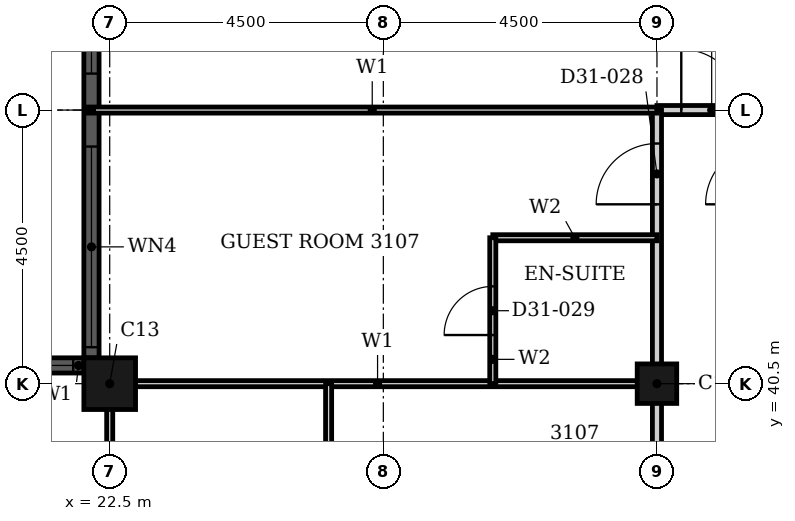
"""IFC4 building model, lengths in metres.
Left out: names, types, materials, properties, quantities, classifications, styles, units other than length and angle.
Written with IfcOpenShell. Run it as: python <this file> out.ifc"""

import sys

from ifc_helpers import new_model, si_unit, direction, frame, frame_2d, origin, origin_2d, place, context, subcontext, project, spatial, rectangle, hollow_rectangle, extrude, element, fill, save


model = new_model("IFC4")
c1 = context("Model", 3, precision=1e-05, world=origin(), true_north=direction((0.0, 1.0)))
c2 = subcontext(c1, "Body", "Model", "MODEL_VIEW")
j1 = project(units=[si_unit("LENGTHUNIT", "METRE"), si_unit("PLANEANGLEUNIT", "RADIAN")], contexts=[c1])
p1 = place(None, origin())
s1 = spatial("IfcSite", under=j1, at=p1, CompositionType="ELEMENT")
p2 = place(p1, origin())
s2 = spatial("IfcBuilding", under=s1, at=p2, CompositionType="ELEMENT")
p3 = place(p2, frame((0.0, 0.0, 126.0)))
s3 = spatial("IfcBuildingStorey", under=s2, at=p3, CompositionType="ELEMENT", Elevation=126.0)
p4 = place(p3, frame((22.5, 40.5, 0.0), z_axis=(0.0, 0.0, 1.0), x_axis=(1.0, 0.0, 0.0)))
e1 = element("IfcColumn", 1, at=p4, inside=s3, PredefinedType="COLUMN", context=c2, shape_type="SweptSolid", body=[
    extrude(hollow_rectangle(XDim=0.85, YDim=0.85, WallThickness=0.026, at=origin_2d()), origin(), (0.0, 0.0, 1.0), 3.6),
])
p5 = place(p3, frame((31.5, 40.5, 0.0), z_axis=(0.0, 0.0, 1.0), x_axis=(1.0, 0.0, 0.0)))
e2 = element("IfcColumn", 2, at=p5, inside=s3, PredefinedType="COLUMN", context=c2, shape_type="SweptSolid", body=[
    extrude(hollow_rectangle(XDim=0.65, YDim=0.65, WallThickness=0.021, at=origin_2d()), origin(), (0.0, 0.0, 1.0), 3.6),
])
p6 = place(p3, frame((22.2, 49.075, 0.0), z_axis=(0.0, 0.0, 1.0), x_axis=(0.0, -1.0, 0.0)))
e3 = element("IfcWall", 3, at=p6, inside=s3, PredefinedType="SOLIDWALL", context=c2, shape_type="SweptSolid", body=[
    extrude(rectangle(XDim=8.15, YDim=0.25, at=frame_2d((4.075, 0.0))), origin(), (0.0, 0.0, 1.0), 3.6),
])
p7 = place(p6, frame((0.175, 0.0, 0.9)))
e4 = element("IfcOpeningElement", 4, at=p7, cuts=e3, PredefinedType="OPENING", context=c2, shape_type="SweptSolid", body=[
    extrude(rectangle(XDim=3.3, YDim=2.08, at=frame_2d((1.65, 1.04))), frame((0.0, 0.135, 0.0), z_axis=(0.0, -1.0, 0.0), x_axis=(1.0, 0.0, 0.0)), (0.0, 0.0, 1.0), 0.27),
])
p8 = place(p6, frame((4.675, 0.0, 0.9)))
e5 = element("IfcOpeningElement", 5, at=p8, cuts=e3, PredefinedType="OPENING", context=c2, shape_type="SweptSolid", body=[
    extrude(rectangle(XDim=3.3, YDim=2.08, at=frame_2d((1.65, 1.04))), frame((0.0, 0.135, 0.0), z_axis=(0.0, -1.0, 0.0), x_axis=(1.0, 0.0, 0.0)), (0.0, 0.0, 1.0), 0.27),
])
p9 = place(p3, frame((22.075, 40.8, 0.0), z_axis=(0.0, 0.0, 1.0), x_axis=(-1.0, 0.0, 0.0)))
e6 = element("IfcWall", 6, at=p9, inside=s3, PredefinedType="SOLIDWALL", context=c2, shape_type="SweptSolid", body=[
    extrude(rectangle(XDim=3.65, YDim=0.25, at=frame_2d((1.825, 0.0))), origin(), (0.0, 0.0, 1.0), 3.6),
])
p10 = place(p9, frame((0.175, 0.0, 0.9)))
e7 = element("IfcOpeningElement", 7, at=p10, cuts=e6, PredefinedType="OPENING", context=c2, shape_type="SweptSolid", body=[
    extrude(rectangle(XDim=3.3, YDim=2.08, at=frame_2d((1.65, 1.04))), frame((0.0, 0.135, 0.0), z_axis=(0.0, -1.0, 0.0), x_axis=(1.0, 0.0, 0.0)), (0.0, 0.0, 1.0), 0.27),
])
p11 = place(p3, frame((31.5, 45.0, 0.0), z_axis=(0.0, 0.0, 1.0), x_axis=(1.0, 0.0, 0.0)))
e8 = element("IfcWall", 8, at=p11, inside=s3, PredefinedType="PARTITIONING", context=c2, shape_type="SweptSolid", body=[
    extrude(rectangle(XDim=1.8, YDim=0.15, at=frame_2d((0.9, 0.0))), origin(), (0.0, 0.0, 1.0), 3.3),
])
p12 = place(p11, frame((0.4, 0.0, 0.0)))
e9 = element("IfcOpeningElement", 9, at=p12, cuts=e8, PredefinedType="OPENING", context=c2, shape_type="SweptSolid", body=[
    extrude(rectangle(XDim=1.0, YDim=2.1, at=frame_2d((0.5, 1.05))), frame((0.0, 0.085, 0.0), z_axis=(0.0, -1.0, 0.0), x_axis=(1.0, 0.0, 0.0)), (0.0, 0.0, 1.0), 0.17),
])
p13 = place(p3, frame((31.5, 33.3, 0.0), z_axis=(0.0, 0.0, 1.0), x_axis=(0.0, 1.0, 0.0)))
e10 = element("IfcWall", 10, at=p13, inside=s3, PredefinedType="PARTITIONING", context=c2, shape_type="SweptSolid", body=[
    extrude(rectangle(XDim=11.7, YDim=0.15, at=frame_2d((5.85, 0.0))), origin(), (0.0, 0.0, 1.0), 2.58),
])
p14 = place(p13, frame((10.15, 0.0, 0.0)))
e11 = element("IfcOpeningElement", 11, at=p14, cuts=e10, PredefinedType="OPENING", context=c2, shape_type="SweptSolid", body=[
    extrude(rectangle(XDim=1.0, YDim=2.1, at=frame_2d((0.5, 1.05))), frame((0.0, 0.085, 0.0), z_axis=(0.0, -1.0, 0.0), x_axis=(1.0, 0.0, 0.0)), (0.0, 0.0, 1.0), 0.17),
])
p15 = place(p3, frame((22.31, 40.5, 0.0), z_axis=(0.0, 0.0, 1.0), x_axis=(1.0, 0.0, 0.0)))
e12 = element("IfcWall", 12, at=p15, inside=s3, PredefinedType="PARTITIONING", context=c2, shape_type="SweptSolid", body=[
    extrude(rectangle(XDim=9.19, YDim=0.1, at=frame_2d((4.595, 0.0))), origin(), (0.0, 0.0, 1.0), 2.38),
])
p16 = place(p3, frame((22.135, 45.0, 0.0), z_axis=(0.0, 0.0, 1.0), x_axis=(1.0, 0.0, 0.0)))
e13 = element("IfcWall", 13, at=p16, inside=s3, PredefinedType="PARTITIONING", context=c2, shape_type="SweptSolid", body=[
    extrude(rectangle(XDim=9.365, YDim=0.1, at=frame_2d((4.683, 0.0))), origin(), (0.0, 0.0, 1.0), 3.3),
])
p17 = place(p3, frame((22.5, 33.3, 0.0), z_axis=(0.0, 0.0, 1.0), x_axis=(0.0, 1.0, 0.0)))
e14 = element("IfcWall", 14, at=p17, inside=s3, PredefinedType="PARTITIONING", context=c2, shape_type="SweptSolid", body=[
    extrude(rectangle(XDim=7.39, YDim=0.1, at=frame_2d((3.695, 0.0))), origin(), (0.0, 0.0, 1.0), 3.3),
])
p18 = place(p3, frame((26.1, 33.3, 0.0), z_axis=(0.0, 0.0, 1.0), x_axis=(0.0, 1.0, 0.0)))
e15 = element("IfcWall", 15, at=p18, inside=s3, PredefinedType="PARTITIONING", context=c2, shape_type="SweptSolid", body=[
    extrude(rectangle(XDim=7.2, YDim=0.1, at=frame_2d((3.6, 0.0))), origin(), (0.0, 0.0, 1.0), 3.3),
])
p19 = place(p3, frame((28.8, 42.9, 0.0), z_axis=(0.0, 0.0, 1.0), x_axis=(1.0, 0.0, 0.0)))
e16 = element("IfcWall", 16, at=p19, inside=s3, PredefinedType="PARTITIONING", context=c2, shape_type="SweptSolid", body=[
    extrude(rectangle(XDim=2.7, YDim=0.1, at=frame_2d((1.35, 0.0))), origin(), (0.0, 0.0, 1.0), 3.3),
])
p20 = place(p3, frame((28.8, 40.5, 0.0), z_axis=(0.0, 0.0, 1.0), x_axis=(0.0, 1.0, 0.0)))
e17 = element("IfcWall", 17, at=p20, inside=s3, PredefinedType="PARTITIONING", context=c2, shape_type="SweptSolid", body=[
    extrude(rectangle(XDim=2.4, YDim=0.1, at=frame_2d((1.2, 0.0))), origin(), (0.0, 0.0, 1.0), 3.3),
])
p21 = place(p20, frame((0.8, 0.0, 0.0)))
e18 = element("IfcOpeningElement", 18, at=p21, cuts=e17, PredefinedType="OPENING", context=c2, shape_type="SweptSolid", body=[
    extrude(rectangle(XDim=0.8, YDim=2.1, at=frame_2d((0.4, 1.05))), frame((0.0, 0.06, 0.0), z_axis=(0.0, -1.0, 0.0), x_axis=(1.0, 0.0, 0.0)), (0.0, 0.0, 1.0), 0.12),
])
p22 = place(p7, origin())
e19 = element("IfcWindow", 19, at=p22, inside=s3, PartitioningType="SINGLE_PANEL", PredefinedType="WINDOW", context=c2, shape_type="SweptSolid", body=[
    extrude(rectangle(XDim=3.3, YDim=2.08, at=frame_2d((1.65, 1.04))), frame((0.0, 0.03, 0.0), z_axis=(0.0, -1.0, 0.0), x_axis=(1.0, 0.0, 0.0)), (0.0, 0.0, 1.0), 0.06),
])
fill(e4, e19)
p23 = place(p8, origin())
e20 = element("IfcWindow", 20, at=p23, inside=s3, PartitioningType="SINGLE_PANEL", PredefinedType="WINDOW", context=c2, shape_type="SweptSolid", body=[
    extrude(rectangle(XDim=3.3, YDim=2.08, at=frame_2d((1.65, 1.04))), frame((0.0, 0.03, 0.0), z_axis=(0.0, -1.0, 0.0), x_axis=(1.0, 0.0, 0.0)), (0.0, 0.0, 1.0), 0.06),
])
fill(e5, e20)
p24 = place(p10, origin())
e21 = element("IfcWindow", 21, at=p24, inside=s3, PartitioningType="SINGLE_PANEL", PredefinedType="WINDOW", context=c2, shape_type="SweptSolid", body=[
    extrude(rectangle(XDim=3.3, YDim=2.08, at=frame_2d((1.65, 1.04))), frame((0.0, 0.03, 0.0), z_axis=(0.0, -1.0, 0.0), x_axis=(1.0, 0.0, 0.0)), (0.0, 0.0, 1.0), 0.06),
])
fill(e7, e21)
p25 = place(p14, origin())
e22 = element("IfcDoor", 22, at=p25, inside=s3, OperationType="SINGLE_SWING_RIGHT", PredefinedType="DOOR", context=c2, shape_type="SweptSolid", body=[
    extrude(rectangle(XDim=1.0, YDim=2.1, at=frame_2d((0.5, 1.05))), frame((0.0, 0.025, 0.0), z_axis=(0.0, -1.0, 0.0), x_axis=(1.0, 0.0, 0.0)), (0.0, 0.0, 1.0), 0.05),
])
fill(e11, e22)
p26 = place(p21, origin())
e23 = element("IfcDoor", 23, at=p26, inside=s3, OperationType="SINGLE_SWING_LEFT", PredefinedType="DOOR", context=c2, shape_type="SweptSolid", body=[
    extrude(rectangle(XDim=0.8, YDim=2.1, at=frame_2d((0.4, 1.05))), frame((0.0, 0.025, 0.0), z_axis=(0.0, -1.0, 0.0), x_axis=(1.0, 0.0, 0.0)), (0.0, 0.0, 1.0), 0.05),
])
fill(e18, e23)
p27 = place(p12, origin())
e24 = element("IfcDoor", 24, at=p27, inside=s3, OperationType="SINGLE_SWING_RIGHT", PredefinedType="DOOR", context=c2, shape_type="SweptSolid", body=[
    extrude(rectangle(XDim=1.0, YDim=2.1, at=frame_2d((0.5, 1.05))), frame((0.0, 0.025, 0.0), z_axis=(0.0, -1.0, 0.0), x_axis=(1.0, 0.0, 0.0)), (0.0, 0.0, 1.0), 0.05),
])
fill(e9, e24)
save(model, sys.argv[1])
